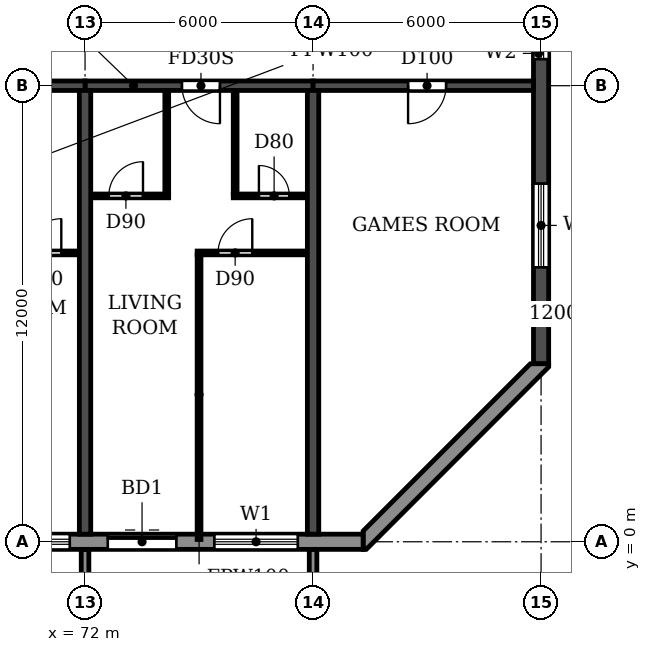
"""IFC4 building model, lengths in metres.
Left out: names, types, materials, properties, quantities, classifications, styles, units other than length and angle.
Written with IfcOpenShell. Run it as: python <this file> out.ifc"""

import sys

from ifc_helpers import new_model, si_unit, direction, frame, frame_2d, origin, place, context, subcontext, project, spatial, polyline, rectangle, outline, extrude, source, transform, mapped, element, fill, save


model = new_model("IFC4")
c1 = context("Model", 3, precision=1e-05, world=origin(), true_north=direction((0.0, 1.0)))
c2 = subcontext(c1, "Body", "Model", "MODEL_VIEW")
j1 = project(units=[si_unit("LENGTHUNIT", "METRE"), si_unit("PLANEANGLEUNIT", "RADIAN")], contexts=[c1])
p1 = place(None, origin())
s1 = spatial("IfcSite", under=j1, at=p1, CompositionType="ELEMENT")
p2 = place(p1, origin())
s2 = spatial("IfcBuilding", under=s1, at=p2, CompositionType="ELEMENT")
p3 = place(p2, frame((0.0, 0.0, 162.0)))
s3 = spatial("IfcBuildingStorey", under=s2, at=p3, CompositionType="ELEMENT", Elevation=162.0)
for number, where, z_axis, x_axis in (
    (1, (72.0, 0.2, 0.0), (0.0, 0.0, 1.0), (0.0, 1.0, 0.0)),
    (2, (78.0, 0.2, 0.0), (0.0, 0.0, 1.0), (0.0, 1.0, 0.0)),
):
    element("IfcWall", number, at=place(p3, frame(where, z_axis=z_axis, x_axis=x_axis)), inside=s3, PredefinedType="SHEAR", context=c2, shape_type="SweptSolid", body=[
        extrude(rectangle(XDim=11.675, YDim=0.3, at=frame_2d((5.837, 0.0))), origin(), (0.0, 0.0, 1.0), 2.95),
    ])
p4 = place(p3, frame((84.0, 4.683, 0.0), z_axis=(0.0, 0.0, 1.0), x_axis=(0.0, 1.0, 0.0)))
e3 = element("IfcWall", 3, at=p4, inside=s3, PredefinedType="SHEAR", context=c2, shape_type="SweptSolid", body=[
    extrude(rectangle(XDim=33.034, YDim=0.4, at=frame_2d((16.517, 0.0))), origin(), (0.0, 0.0, 1.0), 2.95),
])
p5 = place(p4, frame((23.817, 0.0, 0.9)))
e4 = element("IfcOpeningElement", 4, at=p5, cuts=e3, PredefinedType="OPENING", context=c2, shape_type="SweptSolid", body=[
    extrude(rectangle(XDim=1.2, YDim=1.5, at=frame_2d((0.6, 0.75))), frame((0.0, 0.21, 0.0), z_axis=(0.0, -1.0, 0.0), x_axis=(1.0, 0.0, 0.0)), (0.0, 0.0, 1.0), 0.42),
])
p6 = place(p4, frame((8.017, 0.0, 0.9)))
e5 = element("IfcOpeningElement", 5, at=p6, cuts=e3, PredefinedType="OPENING", context=c2, shape_type="SweptSolid", body=[
    extrude(rectangle(XDim=1.2, YDim=1.5, at=frame_2d((0.6, 0.75))), frame((0.0, 0.21, 0.0), z_axis=(0.0, -1.0, 0.0), x_axis=(1.0, 0.0, 0.0)), (0.0, 0.0, 1.0), 0.42),
])
p7 = place(p4, frame((28.293, 0.0, 0.6)))
e6 = element("IfcOpeningElement", 6, at=p7, cuts=e3, PredefinedType="OPENING", context=c2, shape_type="SweptSolid", body=[
    extrude(rectangle(XDim=2.2, YDim=1.8, at=frame_2d((1.1, 0.9))), frame((0.0, 0.21, 0.0), z_axis=(0.0, -1.0, 0.0), x_axis=(1.0, 0.0, 0.0)), (0.0, 0.0, 1.0), 0.42),
])
p8 = place(p4, frame((2.541, 0.0, 0.6)))
e7 = element("IfcOpeningElement", 7, at=p8, cuts=e3, PredefinedType="OPENING", context=c2, shape_type="SweptSolid", body=[
    extrude(rectangle(XDim=2.2, YDim=1.8, at=frame_2d((1.1, 0.9))), frame((0.0, 0.21, 0.0), z_axis=(0.0, -1.0, 0.0), x_axis=(1.0, 0.0, 0.0)), (0.0, 0.0, 1.0), 0.42),
])
p9 = place(p4, frame((15.917, 0.0, 0.9)))
e8 = element("IfcOpeningElement", 8, at=p9, cuts=e3, PredefinedType="OPENING", context=c2, shape_type="SweptSolid", body=[
    extrude(rectangle(XDim=1.2, YDim=1.5, at=frame_2d((0.6, 0.75))), frame((0.0, 0.21, 0.0), z_axis=(0.0, -1.0, 0.0), x_axis=(1.0, 0.0, 0.0)), (0.0, 0.0, 1.0), 0.42),
])
p10 = place(p3, frame((66.0, 12.0, 0.0), z_axis=(0.0, 0.0, 1.0), x_axis=(1.0, 0.0, 0.0)))
e9 = element("IfcWall", 9, at=p10, inside=s3, PredefinedType="SHEAR", context=c2, shape_type="SweptSolid", body=[
    extrude(rectangle(XDim=6.0, YDim=0.25, at=frame_2d((3.0, 0.0))), origin(), (0.0, 0.0, 1.0), 2.35),
])
p11 = place(p10, frame((2.45, 0.0, 0.0)))
e10 = element("IfcOpeningElement", 10, at=p11, cuts=e9, PredefinedType="OPENING", context=c2, shape_type="SweptSolid", body=[
    extrude(rectangle(XDim=1.0, YDim=2.1, at=frame_2d((0.5, 1.05))), frame((0.0, 0.135, 0.0), z_axis=(0.0, -1.0, 0.0), x_axis=(1.0, 0.0, 0.0)), (0.0, 0.0, 1.0), 0.27),
])
p12 = place(p3, frame((72.0, 12.0, 0.0), z_axis=(0.0, 0.0, 1.0), x_axis=(1.0, 0.0, 0.0)))
e11 = element("IfcWall", 11, at=p12, inside=s3, PredefinedType="SHEAR", context=c2, shape_type="SweptSolid", body=[
    extrude(rectangle(XDim=6.0, YDim=0.25, at=frame_2d((3.0, 0.0))), origin(), (0.0, 0.0, 1.0), 2.35),
])
p13 = place(p12, frame((2.55, 0.0, 0.0)))
e12 = element("IfcOpeningElement", 12, at=p13, cuts=e11, PredefinedType="OPENING", context=c2, shape_type="SweptSolid", body=[
    extrude(rectangle(XDim=1.0, YDim=2.1, at=frame_2d((0.5, 1.05))), frame((0.0, 0.135, 0.0), z_axis=(0.0, -1.0, 0.0), x_axis=(1.0, 0.0, 0.0)), (0.0, 0.0, 1.0), 0.27),
])
p14 = place(p3, frame((78.0, 12.0, 0.0), z_axis=(0.0, 0.0, 1.0), x_axis=(1.0, 0.0, 0.0)))
e13 = element("IfcWall", 13, at=p14, inside=s3, PredefinedType="SHEAR", context=c2, shape_type="SweptSolid", body=[
    extrude(rectangle(XDim=5.8, YDim=0.25, at=frame_2d((2.9, 0.0))), origin(), (0.0, 0.0, 1.0), 2.35),
])
p15 = place(p14, frame((2.5, 0.0, 0.0)))
e14 = element("IfcOpeningElement", 14, at=p15, cuts=e13, PredefinedType="OPENING", context=c2, shape_type="SweptSolid", body=[
    extrude(rectangle(XDim=1.0, YDim=2.1, at=frame_2d((0.5, 1.05))), frame((0.0, 0.135, 0.0), z_axis=(0.0, -1.0, 0.0), x_axis=(1.0, 0.0, 0.0)), (0.0, 0.0, 1.0), 0.27),
])
p16 = place(p3, frame((22.683, 0.0, 0.0), z_axis=(0.0, 0.0, 1.0), x_axis=(1.0, 0.0, 0.0)))
e15 = element("IfcWall", 15, at=p16, inside=s3, PredefinedType="STANDARD", context=c2, shape_type="SweptSolid", body=[
    extrude(rectangle(XDim=56.634, YDim=0.4, at=frame_2d((28.317, 0.0))), origin(), (0.0, 0.0, 1.0), 2.95),
])
p17 = place(p16, frame((1.717, 0.0, 0.9)))
e16 = element("IfcOpeningElement", 16, at=p17, cuts=e15, PredefinedType="OPENING", context=c2, shape_type="SweptSolid", body=[
    extrude(rectangle(XDim=2.2, YDim=1.5, at=frame_2d((1.1, 0.75))), frame((0.0, 0.21, 0.0), z_axis=(0.0, -1.0, 0.0), x_axis=(1.0, 0.0, 0.0)), (0.0, 0.0, 1.0), 0.42),
])
p18 = place(p16, frame((4.917, 0.0, 0.0)))
e17 = element("IfcOpeningElement", 17, at=p18, cuts=e15, PredefinedType="OPENING", context=c2, shape_type="SweptSolid", body=[
    extrude(rectangle(XDim=1.8, YDim=2.4, at=frame_2d((0.9, 1.2))), frame((0.0, 0.21, 0.0), z_axis=(0.0, -1.0, 0.0), x_axis=(1.0, 0.0, 0.0)), (0.0, 0.0, 1.0), 0.42),
])
p19 = place(p16, frame((7.717, 0.0, 0.9)))
e18 = element("IfcOpeningElement", 18, at=p19, cuts=e15, PredefinedType="OPENING", context=c2, shape_type="SweptSolid", body=[
    extrude(rectangle(XDim=2.2, YDim=1.5, at=frame_2d((1.1, 0.75))), frame((0.0, 0.21, 0.0), z_axis=(0.0, -1.0, 0.0), x_axis=(1.0, 0.0, 0.0)), (0.0, 0.0, 1.0), 0.42),
])
p20 = place(p16, frame((10.717, 0.0, 0.9)))
e19 = element("IfcOpeningElement", 19, at=p20, cuts=e15, PredefinedType="OPENING", context=c2, shape_type="SweptSolid", body=[
    extrude(rectangle(XDim=2.2, YDim=1.5, at=frame_2d((1.1, 0.75))), frame((0.0, 0.21, 0.0), z_axis=(0.0, -1.0, 0.0), x_axis=(1.0, 0.0, 0.0)), (0.0, 0.0, 1.0), 0.42),
])
p21 = place(p16, frame((13.717, 0.0, 0.9)))
e20 = element("IfcOpeningElement", 20, at=p21, cuts=e15, PredefinedType="OPENING", context=c2, shape_type="SweptSolid", body=[
    extrude(rectangle(XDim=2.2, YDim=1.5, at=frame_2d((1.1, 0.75))), frame((0.0, 0.21, 0.0), z_axis=(0.0, -1.0, 0.0), x_axis=(1.0, 0.0, 0.0)), (0.0, 0.0, 1.0), 0.42),
])
p22 = place(p16, frame((16.917, 0.0, 0.0)))
e21 = element("IfcOpeningElement", 21, at=p22, cuts=e15, PredefinedType="OPENING", context=c2, shape_type="SweptSolid", body=[
    extrude(rectangle(XDim=1.8, YDim=2.4, at=frame_2d((0.9, 1.2))), frame((0.0, 0.21, 0.0), z_axis=(0.0, -1.0, 0.0), x_axis=(1.0, 0.0, 0.0)), (0.0, 0.0, 1.0), 0.42),
])
p23 = place(p16, frame((19.717, 0.0, 0.9)))
e22 = element("IfcOpeningElement", 22, at=p23, cuts=e15, PredefinedType="OPENING", context=c2, shape_type="SweptSolid", body=[
    extrude(rectangle(XDim=2.2, YDim=1.5, at=frame_2d((1.1, 0.75))), frame((0.0, 0.21, 0.0), z_axis=(0.0, -1.0, 0.0), x_axis=(1.0, 0.0, 0.0)), (0.0, 0.0, 1.0), 0.42),
])
p24 = place(p16, frame((22.717, 0.0, 0.9)))
e23 = element("IfcOpeningElement", 23, at=p24, cuts=e15, PredefinedType="OPENING", context=c2, shape_type="SweptSolid", body=[
    extrude(rectangle(XDim=2.2, YDim=1.5, at=frame_2d((1.1, 0.75))), frame((0.0, 0.21, 0.0), z_axis=(0.0, -1.0, 0.0), x_axis=(1.0, 0.0, 0.0)), (0.0, 0.0, 1.0), 0.42),
])
p25 = place(p16, frame((25.717, 0.0, 0.9)))
e24 = element("IfcOpeningElement", 24, at=p25, cuts=e15, PredefinedType="OPENING", context=c2, shape_type="SweptSolid", body=[
    extrude(rectangle(XDim=2.2, YDim=1.5, at=frame_2d((1.1, 0.75))), frame((0.0, 0.21, 0.0), z_axis=(0.0, -1.0, 0.0), x_axis=(1.0, 0.0, 0.0)), (0.0, 0.0, 1.0), 0.42),
])
p26 = place(p16, frame((28.717, 0.0, 0.9)))
e25 = element("IfcOpeningElement", 25, at=p26, cuts=e15, PredefinedType="OPENING", context=c2, shape_type="SweptSolid", body=[
    extrude(rectangle(XDim=2.2, YDim=1.5, at=frame_2d((1.1, 0.75))), frame((0.0, 0.21, 0.0), z_axis=(0.0, -1.0, 0.0), x_axis=(1.0, 0.0, 0.0)), (0.0, 0.0, 1.0), 0.42),
])
p27 = place(p16, frame((31.717, 0.0, 0.9)))
e26 = element("IfcOpeningElement", 26, at=p27, cuts=e15, PredefinedType="OPENING", context=c2, shape_type="SweptSolid", body=[
    extrude(rectangle(XDim=2.2, YDim=1.5, at=frame_2d((1.1, 0.75))), frame((0.0, 0.21, 0.0), z_axis=(0.0, -1.0, 0.0), x_axis=(1.0, 0.0, 0.0)), (0.0, 0.0, 1.0), 0.42),
])
p28 = place(p16, frame((34.717, 0.0, 0.9)))
e27 = element("IfcOpeningElement", 27, at=p28, cuts=e15, PredefinedType="OPENING", context=c2, shape_type="SweptSolid", body=[
    extrude(rectangle(XDim=2.2, YDim=1.5, at=frame_2d((1.1, 0.75))), frame((0.0, 0.21, 0.0), z_axis=(0.0, -1.0, 0.0), x_axis=(1.0, 0.0, 0.0)), (0.0, 0.0, 1.0), 0.42),
])
p29 = place(p16, frame((37.717, 0.0, 0.9)))
e28 = element("IfcOpeningElement", 28, at=p29, cuts=e15, PredefinedType="OPENING", context=c2, shape_type="SweptSolid", body=[
    extrude(rectangle(XDim=2.2, YDim=1.5, at=frame_2d((1.1, 0.75))), frame((0.0, 0.21, 0.0), z_axis=(0.0, -1.0, 0.0), x_axis=(1.0, 0.0, 0.0)), (0.0, 0.0, 1.0), 0.42),
])
p30 = place(p16, frame((40.717, 0.0, 0.9)))
e29 = element("IfcOpeningElement", 29, at=p30, cuts=e15, PredefinedType="OPENING", context=c2, shape_type="SweptSolid", body=[
    extrude(rectangle(XDim=2.2, YDim=1.5, at=frame_2d((1.1, 0.75))), frame((0.0, 0.21, 0.0), z_axis=(0.0, -1.0, 0.0), x_axis=(1.0, 0.0, 0.0)), (0.0, 0.0, 1.0), 0.42),
])
p31 = place(p16, frame((43.717, 0.0, 0.9)))
e30 = element("IfcOpeningElement", 30, at=p31, cuts=e15, PredefinedType="OPENING", context=c2, shape_type="SweptSolid", body=[
    extrude(rectangle(XDim=2.2, YDim=1.5, at=frame_2d((1.1, 0.75))), frame((0.0, 0.21, 0.0), z_axis=(0.0, -1.0, 0.0), x_axis=(1.0, 0.0, 0.0)), (0.0, 0.0, 1.0), 0.42),
])
p32 = place(p16, frame((46.717, 0.0, 0.9)))
e31 = element("IfcOpeningElement", 31, at=p32, cuts=e15, PredefinedType="OPENING", context=c2, shape_type="SweptSolid", body=[
    extrude(rectangle(XDim=2.2, YDim=1.5, at=frame_2d((1.1, 0.75))), frame((0.0, 0.21, 0.0), z_axis=(0.0, -1.0, 0.0), x_axis=(1.0, 0.0, 0.0)), (0.0, 0.0, 1.0), 0.42),
])
p33 = place(p16, frame((49.917, 0.0, 0.0)))
e32 = element("IfcOpeningElement", 32, at=p33, cuts=e15, PredefinedType="OPENING", context=c2, shape_type="SweptSolid", body=[
    extrude(rectangle(XDim=1.8, YDim=2.4, at=frame_2d((0.9, 1.2))), frame((0.0, 0.21, 0.0), z_axis=(0.0, -1.0, 0.0), x_axis=(1.0, 0.0, 0.0)), (0.0, 0.0, 1.0), 0.42),
])
p34 = place(p16, frame((52.717, 0.0, 0.9)))
e33 = element("IfcOpeningElement", 33, at=p34, cuts=e15, PredefinedType="OPENING", context=c2, shape_type="SweptSolid", body=[
    extrude(rectangle(XDim=2.2, YDim=1.5, at=frame_2d((1.1, 0.75))), frame((0.0, 0.21, 0.0), z_axis=(0.0, -1.0, 0.0), x_axis=(1.0, 0.0, 0.0)), (0.0, 0.0, 1.0), 0.42),
])
p35 = place(p3, origin())
e34 = element("IfcWall", 34, at=p35, inside=s3, PredefinedType="STANDARD", context=c2, shape_type="SweptSolid", body=[
    extrude(outline(polyline([(79.317, -0.2), (79.4, -0.2), (84.2, 4.6), (84.2, 4.683), (83.717, 4.683), (79.317, 0.283), (79.317, -0.2)])), origin(), (0.0, 0.0, 1.0), 2.95),
])
m1 = source(origin(), c2, "Body", "SweptSolid", [
    extrude(outline(polyline([(0.0, 0.0), (0.2, 0.0), (0.2, 1.65), (0.0, 1.65), (0.0, 0.0)])), origin(), (0.0, 0.0, 1.0), 3.1),
])
for number, where in (
    (35, (71.9, -1.85, 0.0)),
    (36, (77.9, -1.85, 0.0)),
):
    element("IfcWall", number, at=place(p3, frame(where)), inside=s3, PredefinedType="STANDARD", context=c2, shape_type="MappedRepresentation", body=[
        mapped(m1, transform((0.0, 0.0, 0.0))),
    ])
p36 = place(p3, frame((69.8, 7.6, 0.0), z_axis=(0.0, 0.0, 1.0), x_axis=(1.0, 0.0, 0.0)))
e37 = element("IfcWall", 37, at=p36, inside=s3, PredefinedType="PARTITIONING", context=c2, shape_type="SweptSolid", body=[
    extrude(rectangle(XDim=2.04, YDim=0.1, at=frame_2d((1.02, 0.0))), origin(), (0.0, 0.0, 1.0), 2.95),
])
p37 = place(p36, frame((0.675, 0.0, 0.0)))
e38 = element("IfcOpeningElement", 38, at=p37, cuts=e37, PredefinedType="OPENING", context=c2, shape_type="SweptSolid", body=[
    extrude(rectangle(XDim=0.9, YDim=2.1, at=frame_2d((0.45, 1.05))), frame((0.0, 0.06, 0.0), z_axis=(0.0, -1.0, 0.0), x_axis=(1.0, 0.0, 0.0)), (0.0, 0.0, 1.0), 0.12),
])
p38 = place(p3, frame((74.95, 7.6, 0.0), z_axis=(0.0, 0.0, 1.0), x_axis=(1.0, 0.0, 0.0)))
e39 = element("IfcWall", 39, at=p38, inside=s3, PredefinedType="PARTITIONING", context=c2, shape_type="SweptSolid", body=[
    extrude(rectangle(XDim=2.89, YDim=0.1, at=frame_2d((1.445, 0.0))), origin(), (0.0, 0.0, 1.0), 2.95),
])
p39 = place(p38, frame((0.55, 0.0, 0.0)))
e40 = element("IfcOpeningElement", 40, at=p39, cuts=e39, PredefinedType="OPENING", context=c2, shape_type="SweptSolid", body=[
    extrude(rectangle(XDim=0.9, YDim=2.1, at=frame_2d((0.45, 1.05))), frame((0.0, 0.06, 0.0), z_axis=(0.0, -1.0, 0.0), x_axis=(1.0, 0.0, 0.0)), (0.0, 0.0, 1.0), 0.12),
])
p40 = place(p3, frame((72.16, 9.1, 0.0), z_axis=(0.0, 0.0, 1.0), x_axis=(1.0, 0.0, 0.0)))
e41 = element("IfcWall", 41, at=p40, inside=s3, PredefinedType="PARTITIONING", context=c2, shape_type="SweptSolid", body=[
    extrude(rectangle(XDim=2.04, YDim=0.1, at=frame_2d((1.02, 0.0))), origin(), (0.0, 0.0, 1.0), 2.95),
])
p41 = place(p40, frame((0.465, 0.0, 0.0)))
e42 = element("IfcOpeningElement", 42, at=p41, cuts=e41, PredefinedType="OPENING", context=c2, shape_type="SweptSolid", body=[
    extrude(rectangle(XDim=0.9, YDim=2.1, at=frame_2d((0.45, 1.05))), frame((0.0, 0.06, 0.0), z_axis=(0.0, -1.0, 0.0), x_axis=(1.0, 0.0, 0.0)), (0.0, 0.0, 1.0), 0.12),
])
p42 = place(p3, frame((75.9, 9.1, 0.0), z_axis=(0.0, 0.0, 1.0), x_axis=(1.0, 0.0, 0.0)))
e43 = element("IfcWall", 43, at=p42, inside=s3, PredefinedType="PARTITIONING", context=c2, shape_type="SweptSolid", body=[
    extrude(rectangle(XDim=1.94, YDim=0.1, at=frame_2d((0.97, 0.0))), origin(), (0.0, 0.0, 1.0), 2.95),
])
p43 = place(p42, frame((0.675, 0.0, 0.0)))
e44 = element("IfcOpeningElement", 44, at=p43, cuts=e43, PredefinedType="OPENING", context=c2, shape_type="SweptSolid", body=[
    extrude(rectangle(XDim=0.8, YDim=2.1, at=frame_2d((0.4, 1.05))), frame((0.0, 0.06, 0.0), z_axis=(0.0, -1.0, 0.0), x_axis=(1.0, 0.0, 0.0)), (0.0, 0.0, 1.0), 0.12),
])
p44 = place(p3, frame((74.15, 9.15, 0.0), z_axis=(0.0, 0.0, 1.0), x_axis=(0.0, 1.0, 0.0)))
e45 = element("IfcWall", 45, at=p44, inside=s3, PredefinedType="PARTITIONING", context=c2, shape_type="SweptSolid", body=[
    extrude(rectangle(XDim=2.715, YDim=0.1, at=frame_2d((1.357, 0.0))), origin(), (0.0, 0.0, 1.0), 2.95),
])
p45 = place(p3, frame((75.0, 0.06, 0.0), z_axis=(0.0, 0.0, 1.0), x_axis=(0.0, 1.0, 0.0)))
e46 = element("IfcWall", 46, at=p45, inside=s3, PredefinedType="PARTITIONING", context=c2, shape_type="SweptSolid", body=[
    extrude(rectangle(XDim=7.49, YDim=0.1, at=frame_2d((3.745, 0.0))), origin(), (0.0, 0.0, 1.0), 2.95),
])
p46 = place(p3, frame((75.95, 9.15, 0.0), z_axis=(0.0, 0.0, 1.0), x_axis=(0.0, 1.0, 0.0)))
e47 = element("IfcWall", 47, at=p46, inside=s3, PredefinedType="PARTITIONING", context=c2, shape_type="SweptSolid", body=[
    extrude(rectangle(XDim=2.715, YDim=0.1, at=frame_2d((1.357, 0.0))), origin(), (0.0, 0.0, 1.0), 2.95),
])
p47 = place(p32, origin())
e48 = element("IfcWindow", 48, at=p47, inside=s3, PartitioningType="DOUBLE_PANEL_HORIZONTAL", PredefinedType="WINDOW", context=c2, shape_type="SweptSolid", body=[
    extrude(rectangle(XDim=2.2, YDim=1.5, at=frame_2d((1.1, 0.75))), frame((0.0, 0.03, 0.0), z_axis=(0.0, -1.0, 0.0), x_axis=(1.0, 0.0, 0.0)), (0.0, 0.0, 1.0), 0.06),
])
fill(e31, e48)
p48 = place(p33, origin())
e49 = element("IfcDoor", 49, at=p48, inside=s3, OperationType="DOUBLE_DOOR_SLIDING", PredefinedType="DOOR", context=c2, shape_type="SweptSolid", body=[
    extrude(rectangle(XDim=1.8, YDim=2.4, at=frame_2d((0.9, 1.2))), frame((0.0, 0.025, 0.0), z_axis=(0.0, -1.0, 0.0), x_axis=(1.0, 0.0, 0.0)), (0.0, 0.0, 1.0), 0.05),
])
fill(e32, e49)
p49 = place(p34, origin())
e50 = element("IfcWindow", 50, at=p49, inside=s3, PartitioningType="DOUBLE_PANEL_HORIZONTAL", PredefinedType="WINDOW", context=c2, shape_type="SweptSolid", body=[
    extrude(rectangle(XDim=2.2, YDim=1.5, at=frame_2d((1.1, 0.75))), frame((0.0, 0.03, 0.0), z_axis=(0.0, -1.0, 0.0), x_axis=(1.0, 0.0, 0.0)), (0.0, 0.0, 1.0), 0.06),
])
fill(e33, e50)
p50 = place(p6, origin())
e51 = element("IfcWindow", 51, at=p50, inside=s3, PartitioningType="SINGLE_PANEL", PredefinedType="WINDOW", context=c2, shape_type="SweptSolid", body=[
    extrude(rectangle(XDim=1.2, YDim=1.5, at=frame_2d((0.6, 0.75))), frame((0.0, 0.03, 0.0), z_axis=(0.0, -1.0, 0.0), x_axis=(1.0, 0.0, 0.0)), (0.0, 0.0, 1.0), 0.06),
])
fill(e5, e51)
p51 = place(p8, origin())
e52 = element("IfcWindow", 52, at=p51, inside=s3, PartitioningType="DOUBLE_PANEL_HORIZONTAL", PredefinedType="WINDOW", context=c2, shape_type="SweptSolid", body=[
    extrude(rectangle(XDim=2.2, YDim=1.8, at=frame_2d((1.1, 0.9))), frame((0.0, 0.03, 0.0), z_axis=(0.0, -1.0, 0.0), x_axis=(1.0, 0.0, 0.0)), (0.0, 0.0, 1.0), 0.06),
])
fill(e7, e52)
p52 = place(p37, origin())
e53 = element("IfcDoor", 53, at=p52, inside=s3, OperationType="SINGLE_SWING_RIGHT", PredefinedType="DOOR", context=c2, shape_type="SweptSolid", body=[
    extrude(rectangle(XDim=0.9, YDim=2.1, at=frame_2d((0.45, 1.05))), frame((0.0, 0.025, 0.0), z_axis=(0.0, -1.0, 0.0), x_axis=(1.0, 0.0, 0.0)), (0.0, 0.0, 1.0), 0.05),
])
fill(e38, e53)
p53 = place(p41, origin())
e54 = element("IfcDoor", 54, at=p53, inside=s3, OperationType="SINGLE_SWING_RIGHT", PredefinedType="DOOR", context=c2, shape_type="SweptSolid", body=[
    extrude(rectangle(XDim=0.9, YDim=2.1, at=frame_2d((0.45, 1.05))), frame((0.0, 0.025, 0.0), z_axis=(0.0, -1.0, 0.0), x_axis=(1.0, 0.0, 0.0)), (0.0, 0.0, 1.0), 0.05),
])
fill(e42, e54)
p54 = place(p13, frame((1.0, 0.0, 0.0), z_axis=(0.0, 0.0, 1.0), x_axis=(-1.0, 0.0, 0.0)))
e55 = element("IfcDoor", 55, at=p54, inside=s3, OperationType="SINGLE_SWING_LEFT", PredefinedType="DOOR", context=c2, shape_type="SweptSolid", body=[
    extrude(rectangle(XDim=1.0, YDim=2.1, at=frame_2d((0.5, 1.05))), frame((0.0, 0.025, 0.0), z_axis=(0.0, -1.0, 0.0), x_axis=(1.0, 0.0, 0.0)), (0.0, 0.0, 1.0), 0.05),
])
fill(e12, e55)
p55 = place(p39, origin())
e56 = element("IfcDoor", 56, at=p55, inside=s3, OperationType="SINGLE_SWING_RIGHT", PredefinedType="DOOR", context=c2, shape_type="SweptSolid", body=[
    extrude(rectangle(XDim=0.9, YDim=2.1, at=frame_2d((0.45, 1.05))), frame((0.0, 0.025, 0.0), z_axis=(0.0, -1.0, 0.0), x_axis=(1.0, 0.0, 0.0)), (0.0, 0.0, 1.0), 0.05),
])
fill(e40, e56)
p56 = place(p43, origin())
e57 = element("IfcDoor", 57, at=p56, inside=s3, OperationType="SINGLE_SWING_LEFT", PredefinedType="DOOR", context=c2, shape_type="SweptSolid", body=[
    extrude(rectangle(XDim=0.8, YDim=2.1, at=frame_2d((0.4, 1.05))), frame((0.0, 0.025, 0.0), z_axis=(0.0, -1.0, 0.0), x_axis=(1.0, 0.0, 0.0)), (0.0, 0.0, 1.0), 0.05),
])
fill(e44, e57)
p57 = place(p15, frame((1.0, 0.0, 0.0), z_axis=(0.0, 0.0, 1.0), x_axis=(-1.0, 0.0, 0.0)))
e58 = element("IfcDoor", 58, at=p57, inside=s3, OperationType="SINGLE_SWING_RIGHT", PredefinedType="DOOR", context=c2, shape_type="SweptSolid", body=[
    extrude(rectangle(XDim=1.0, YDim=2.1, at=frame_2d((0.5, 1.05))), frame((0.0, 0.025, 0.0), z_axis=(0.0, -1.0, 0.0), x_axis=(1.0, 0.0, 0.0)), (0.0, 0.0, 1.0), 0.05),
])
fill(e14, e58)
save(model, sys.argv[1])
